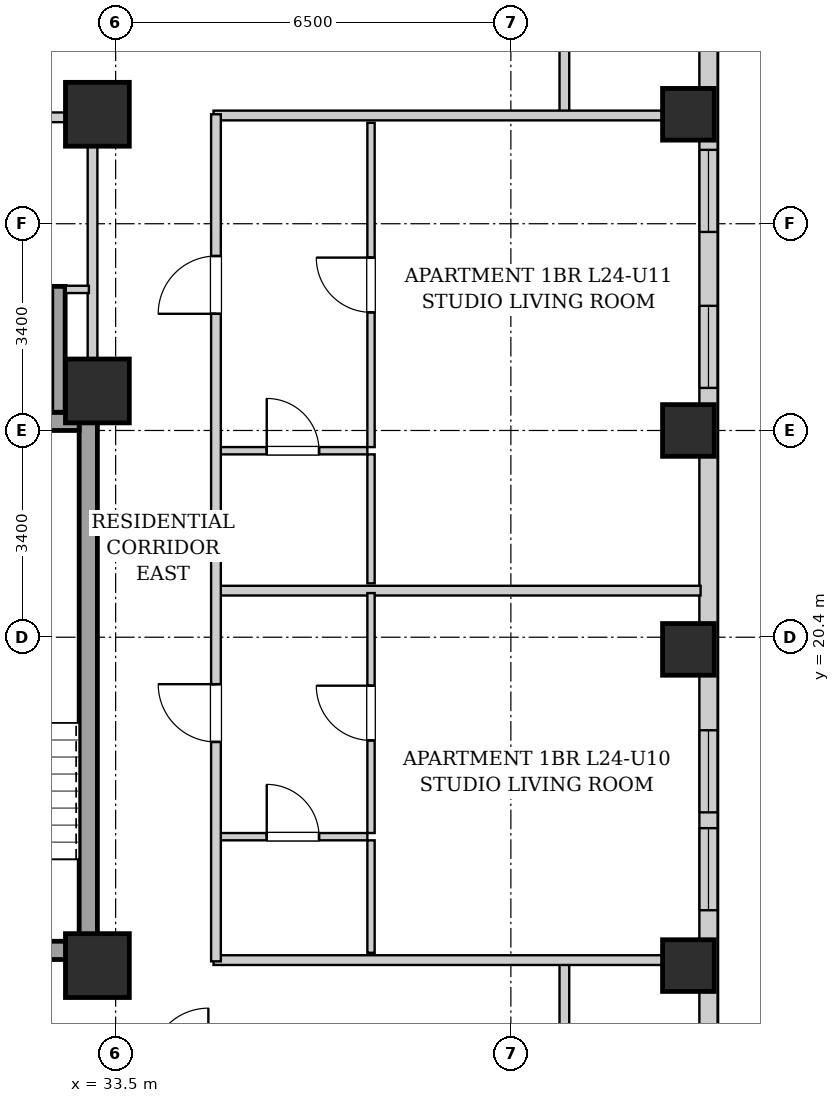
"""IFC4 building model, lengths in metres.
Left out: names, types, materials, properties, quantities, classifications, styles, units other than length and angle.
Written with IfcOpenShell. Run it as: python <this file> out.ifc"""

import sys

from ifc_helpers import new_model, si_unit, direction, frame, frame_2d, origin, origin_2d, place, context, subcontext, project, spatial, rectangle, extrude, element, fill, save


model = new_model("IFC4")
c1 = context("Model", 3, precision=1e-05, world=origin(), true_north=direction((0.0, 1.0)))
c2 = subcontext(c1, "Body", "Model", "MODEL_VIEW")
j1 = project(units=[si_unit("LENGTHUNIT", "METRE"), si_unit("PLANEANGLEUNIT", "RADIAN")], contexts=[c1])
p1 = place(None, origin())
s1 = spatial("IfcSite", under=j1, at=p1, CompositionType="ELEMENT")
p2 = place(p1, origin())
s2 = spatial("IfcBuilding", under=s1, at=p2, CompositionType="ELEMENT")
p3 = place(p2, frame((0.0, 0.0, 87.9)))
s3 = spatial("IfcBuildingStorey", under=s2, at=p3, CompositionType="ELEMENT", Elevation=87.9)
for number, where, z_axis, x_axis in (
    (1, (42.92, 15.0, 0.0), (0.0, 0.0, 1.0), (1.0, 0.0, 0.0)),
    (2, (42.92, 20.2, 0.0), (0.0, 0.0, 1.0), (1.0, 0.0, 0.0)),
    (3, (42.92, 23.8, 0.0), (0.0, 0.0, 1.0), (1.0, 0.0, 0.0)),
    (4, (42.92, 29.0, 0.0), (0.0, 0.0, 1.0), (1.0, 0.0, 0.0)),
):
    element("IfcColumn", number, at=place(p3, frame(where, z_axis=z_axis, x_axis=x_axis)), inside=s3, PredefinedType="COLUMN", context=c2, shape_type="SweptSolid", body=[
        extrude(rectangle(XDim=0.85, YDim=0.85, at=origin_2d()), origin(), (0.0, 0.0, 1.0), 3.2),
    ])
for number, where, z_axis, x_axis in (
    (5, (33.2, 15.0, 0.0), (0.0, 0.0, 1.0), (1.0, 0.0, 0.0)),
    (6, (33.2, 29.0, 0.0), (0.0, 0.0, 1.0), (1.0, 0.0, 0.0)),
    (7, (33.2, 24.45, 0.0), (0.0, 0.0, 1.0), (1.0, 0.0, 0.0)),
):
    element("IfcColumn", number, at=place(p3, frame(where, z_axis=z_axis, x_axis=x_axis)), inside=s3, PredefinedType="COLUMN", context=c2, shape_type="SweptSolid", body=[
        extrude(rectangle(XDim=1.05, YDim=1.05, at=origin_2d()), origin(), (0.0, 0.0, 1.0), 3.2),
    ])
p4 = place(p3, frame((43.25, 40.8, 0.0), z_axis=(0.0, 0.0, 1.0), x_axis=(0.0, -1.0, 0.0)))
e8 = element("IfcWall", 8, at=p4, inside=s3, PredefinedType="SOLIDWALL", context=c2, shape_type="SweptSolid", body=[
    extrude(rectangle(XDim=38.3, YDim=0.3, at=frame_2d((19.15, 0.0))), origin(), (0.0, 0.0, 1.0), 2.94),
])
p5 = place(p4, frame((33.495, 0.0, 0.55)))
e9 = element("IfcOpeningElement", 9, at=p5, cuts=e8, PredefinedType="OPENING", context=c2, shape_type="SweptSolid", body=[
    extrude(rectangle(XDim=1.35, YDim=1.2, at=frame_2d((0.675, 0.6))), frame((0.0, 0.16, 0.0), z_axis=(0.0, -1.0, 0.0), x_axis=(1.0, 0.0, 0.0)), (0.0, 0.0, 1.0), 0.32),
])
p6 = place(p4, frame((31.785, 0.0, 0.55)))
e10 = element("IfcOpeningElement", 10, at=p6, cuts=e8, PredefinedType="OPENING", context=c2, shape_type="SweptSolid", body=[
    extrude(rectangle(XDim=1.35, YDim=1.2, at=frame_2d((0.675, 0.6))), frame((0.0, 0.16, 0.0), z_axis=(0.0, -1.0, 0.0), x_axis=(1.0, 0.0, 0.0)), (0.0, 0.0, 1.0), 0.32),
])
p7 = place(p4, frame((3.08, 0.0, 0.55)))
e11 = element("IfcOpeningElement", 11, at=p7, cuts=e8, PredefinedType="OPENING", context=c2, shape_type="SweptSolid", body=[
    extrude(rectangle(XDim=1.35, YDim=1.2, at=frame_2d((0.675, 0.6))), frame((0.0, 0.16, 0.0), z_axis=(0.0, -1.0, 0.0), x_axis=(1.0, 0.0, 0.0)), (0.0, 0.0, 1.0), 0.32),
])
p8 = place(p4, frame((1.135, 0.0, 0.55)))
e12 = element("IfcOpeningElement", 12, at=p8, cuts=e8, PredefinedType="OPENING", context=c2, shape_type="SweptSolid", body=[
    extrude(rectangle(XDim=1.35, YDim=1.2, at=frame_2d((0.675, 0.6))), frame((0.0, 0.16, 0.0), z_axis=(0.0, -1.0, 0.0), x_axis=(1.0, 0.0, 0.0)), (0.0, 0.0, 1.0), 0.32),
])
p9 = place(p4, frame((21.93, 0.0, 0.55)))
e13 = element("IfcOpeningElement", 13, at=p9, cuts=e8, PredefinedType="OPENING", context=c2, shape_type="SweptSolid", body=[
    extrude(rectangle(XDim=1.35, YDim=1.2, at=frame_2d((0.675, 0.6))), frame((0.0, 0.16, 0.0), z_axis=(0.0, -1.0, 0.0), x_axis=(1.0, 0.0, 0.0)), (0.0, 0.0, 1.0), 0.32),
])
p10 = place(p4, frame((23.54, 0.0, 0.55)))
e14 = element("IfcOpeningElement", 14, at=p10, cuts=e8, PredefinedType="OPENING", context=c2, shape_type="SweptSolid", body=[
    extrude(rectangle(XDim=1.35, YDim=1.2, at=frame_2d((0.675, 0.6))), frame((0.0, 0.16, 0.0), z_axis=(0.0, -1.0, 0.0), x_axis=(1.0, 0.0, 0.0)), (0.0, 0.0, 1.0), 0.32),
])
p11 = place(p4, frame((14.95, 0.0, 0.55)))
e15 = element("IfcOpeningElement", 15, at=p11, cuts=e8, PredefinedType="OPENING", context=c2, shape_type="SweptSolid", body=[
    extrude(rectangle(XDim=1.35, YDim=1.2, at=frame_2d((0.675, 0.6))), frame((0.0, 0.16, 0.0), z_axis=(0.0, -1.0, 0.0), x_axis=(1.0, 0.0, 0.0)), (0.0, 0.0, 1.0), 0.32),
])
p12 = place(p4, frame((12.385, 0.0, 0.55)))
e16 = element("IfcOpeningElement", 16, at=p12, cuts=e8, PredefinedType="OPENING", context=c2, shape_type="SweptSolid", body=[
    extrude(rectangle(XDim=1.35, YDim=1.2, at=frame_2d((0.675, 0.6))), frame((0.0, 0.16, 0.0), z_axis=(0.0, -1.0, 0.0), x_axis=(1.0, 0.0, 0.0)), (0.0, 0.0, 1.0), 0.32),
])
p13 = place(p3, frame((33.05, 15.1, 0.0), z_axis=(0.0, 0.0, 1.0), x_axis=(0.0, 1.0, 0.0)))
e17 = element("IfcWall", 17, at=p13, inside=s3, PredefinedType="SHEAR", context=c2, shape_type="SweptSolid", body=[
    extrude(rectangle(XDim=9.0, YDim=0.3, at=frame_2d((4.5, 0.0))), origin(), (0.0, 0.0, 1.0), 2.94),
])
p14 = place(p3, frame((30.05, 23.95, 0.0), z_axis=(0.0, 0.0, 1.0), x_axis=(1.0, 0.0, 0.0)))
e18 = element("IfcWall", 18, at=p14, inside=s3, PredefinedType="SHEAR", context=c2, shape_type="SweptSolid", body=[
    extrude(rectangle(XDim=2.85, YDim=0.3, at=frame_2d((1.425, 0.0))), origin(), (0.0, 0.0, 1.0), 2.94),
])
p15 = place(p3, frame((30.05, 15.25, 0.0), z_axis=(0.0, 0.0, 1.0), x_axis=(1.0, 0.0, 0.0)))
e19 = element("IfcWall", 19, at=p15, inside=s3, PredefinedType="SHEAR", context=c2, shape_type="SweptSolid", body=[
    extrude(rectangle(XDim=2.85, YDim=0.3, at=frame_2d((1.425, 0.0))), origin(), (0.0, 0.0, 1.0), 2.94),
])
p16 = place(p15, frame((0.86, 0.0, 0.0)))
e20 = element("IfcOpeningElement", 20, at=p16, cuts=e19, PredefinedType="OPENING", context=c2, shape_type="SweptSolid", body=[
    extrude(rectangle(XDim=1.1, YDim=2.05, at=frame_2d((0.55, 1.025))), frame((0.0, 0.16, 0.0), z_axis=(0.0, -1.0, 0.0), x_axis=(1.0, 0.0, 0.0)), (0.0, 0.0, 1.0), 0.32),
])
p17 = place(p3, frame((32.56, 24.1, 0.0), z_axis=(0.0, 0.0, 1.0), x_axis=(0.0, 1.0, 0.0)))
e21 = element("IfcWall", 21, at=p17, inside=s3, PredefinedType="SHEAR", context=c2, shape_type="SweptSolid", body=[
    extrude(rectangle(XDim=2.07, YDim=0.22, at=frame_2d((1.035, 0.0))), origin(), (0.0, 0.0, 1.0), 2.94),
])
p18 = place(p3, frame((33.12, 24.12, 0.0), z_axis=(0.0, 0.0, 1.0), x_axis=(0.0, 1.0, 0.0)))
e22 = element("IfcWall", 22, at=p18, inside=s3, PredefinedType="PARTITIONING", context=c2, shape_type="SweptSolid", body=[
    extrude(rectangle(XDim=4.76, YDim=0.16, at=frame_2d((2.38, 0.0))), origin(), (0.0, 0.0, 1.0), 2.275),
])
p19 = place(p3, frame((32.68, 26.12, 0.0), z_axis=(0.0, 0.0, 1.0), x_axis=(1.0, 0.0, 0.0)))
e23 = element("IfcWall", 23, at=p19, inside=s3, PredefinedType="PARTITIONING", context=c2, shape_type="SweptSolid", body=[
    extrude(rectangle(XDim=0.38, YDim=0.12, at=frame_2d((0.19, 0.0))), origin(), (0.0, 0.0, 1.0), 2.94),
])
p20 = place(p3, frame((30.08, 28.95, 0.0), z_axis=(0.0, 0.0, 1.0), x_axis=(1.0, 0.0, 0.0)))
e24 = element("IfcWall", 24, at=p20, inside=s3, PredefinedType="PARTITIONING", context=c2, shape_type="SweptSolid", body=[
    extrude(rectangle(XDim=2.96, YDim=0.16, at=frame_2d((1.48, 0.0))), origin(), (0.0, 0.0, 1.0), 2.94),
])
p21 = place(p20, frame((1.045, 0.0, 0.0)))
e25 = element("IfcOpeningElement", 25, at=p21, cuts=e24, PredefinedType="OPENING", context=c2, shape_type="SweptSolid", body=[
    extrude(rectangle(XDim=0.86, YDim=2.05, at=frame_2d((0.43, 1.025))), frame((0.0, 0.09, 0.0), z_axis=(0.0, -1.0, 0.0), x_axis=(1.0, 0.0, 0.0)), (0.0, 0.0, 1.0), 0.18),
])
for number, where, z_axis, x_axis in (
    (26, (40.88, 13.35, 0.0), (0.0, 0.0, 1.0), (0.0, 1.0, 0.0)),
    (27, (40.88, 28.98, 0.0), (0.0, 0.0, 1.0), (0.0, 1.0, 0.0)),
):
    element("IfcWall", number, at=place(p3, frame(where, z_axis=z_axis, x_axis=x_axis)), inside=s3, PredefinedType="PARTITIONING", context=c2, shape_type="SweptSolid", body=[
        extrude(rectangle(XDim=1.74, YDim=0.16, at=frame_2d((0.87, 0.0))), origin(), (0.0, 0.0, 1.0), 2.94),
    ])
for number, where, z_axis, x_axis in (
    (28, (35.11, 15.09, 0.0), (0.0, 0.0, 1.0), (1.0, 0.0, 0.0)),
    (29, (35.11, 28.98, 0.0), (0.0, 0.0, 1.0), (1.0, 0.0, 0.0)),
):
    element("IfcWall", number, at=place(p3, frame(where, z_axis=z_axis, x_axis=x_axis)), inside=s3, PredefinedType="PARTITIONING", context=c2, shape_type="SweptSolid", body=[
        extrude(rectangle(XDim=8.01, YDim=0.16, at=frame_2d((4.005, 0.0))), origin(), (0.0, 0.0, 1.0), 2.309),
    ])
p22 = place(p3, frame((35.19, 21.166, 0.0), z_axis=(0.0, 0.0, 1.0), x_axis=(1.0, 0.0, 0.0)))
e30 = element("IfcWall", 30, at=p22, inside=s3, PredefinedType="PARTITIONING", context=c2, shape_type="SweptSolid", body=[
    extrude(rectangle(XDim=7.93, YDim=0.16, at=frame_2d((3.965, 0.0))), origin(), (0.0, 0.0, 1.0), 2.94),
])
p23 = place(p3, frame((35.19, 17.12, 0.0), z_axis=(0.0, 0.0, 1.0), x_axis=(1.0, 0.0, 0.0)))
e31 = element("IfcWall", 31, at=p23, inside=s3, PredefinedType="PARTITIONING", context=c2, shape_type="SweptSolid", body=[
    extrude(rectangle(XDim=2.45, YDim=0.12, at=frame_2d((1.225, 0.0))), origin(), (0.0, 0.0, 1.0), 2.94),
])
p24 = place(p23, frame((0.795, 0.0, 0.0)))
e32 = element("IfcOpeningElement", 32, at=p24, cuts=e31, PredefinedType="OPENING", context=c2, shape_type="SweptSolid", body=[
    extrude(rectangle(XDim=0.86, YDim=2.05, at=frame_2d((0.43, 1.025))), frame((0.0, 0.07, 0.0), z_axis=(0.0, -1.0, 0.0), x_axis=(1.0, 0.0, 0.0)), (0.0, 0.0, 1.0), 0.14),
])
p25 = place(p3, frame((37.7, 15.21, 0.0), z_axis=(0.0, 0.0, 1.0), x_axis=(0.0, 1.0, 0.0)))
e33 = element("IfcWall", 33, at=p25, inside=s3, PredefinedType="PARTITIONING", context=c2, shape_type="SweptSolid", body=[
    extrude(rectangle(XDim=1.85, YDim=0.12, at=frame_2d((0.925, 0.0))), origin(), (0.0, 0.0, 1.0), 2.94),
])
p26 = place(p3, frame((37.7, 17.18, 0.0), z_axis=(0.0, 0.0, 1.0), x_axis=(0.0, 1.0, 0.0)))
e34 = element("IfcWall", 34, at=p26, inside=s3, PredefinedType="PARTITIONING", context=c2, shape_type="SweptSolid", body=[
    extrude(rectangle(XDim=3.946, YDim=0.12, at=frame_2d((1.973, 0.0))), origin(), (0.0, 0.0, 1.0), 2.94),
])
p27 = place(p26, frame((1.523, 0.0, 0.0)))
e35 = element("IfcOpeningElement", 35, at=p27, cuts=e34, PredefinedType="OPENING", context=c2, shape_type="SweptSolid", body=[
    extrude(rectangle(XDim=0.9, YDim=2.05, at=frame_2d((0.45, 1.025))), frame((0.0, 0.07, 0.0), z_axis=(0.0, -1.0, 0.0), x_axis=(1.0, 0.0, 0.0)), (0.0, 0.0, 1.0), 0.14),
])
p28 = place(p3, frame((35.19, 23.467, 0.0), z_axis=(0.0, 0.0, 1.0), x_axis=(1.0, 0.0, 0.0)))
e36 = element("IfcWall", 36, at=p28, inside=s3, PredefinedType="PARTITIONING", context=c2, shape_type="SweptSolid", body=[
    extrude(rectangle(XDim=2.45, YDim=0.12, at=frame_2d((1.225, 0.0))), origin(), (0.0, 0.0, 1.0), 2.94),
])
p29 = place(p28, frame((0.795, 0.0, 0.0)))
e37 = element("IfcOpeningElement", 37, at=p29, cuts=e36, PredefinedType="OPENING", context=c2, shape_type="SweptSolid", body=[
    extrude(rectangle(XDim=0.86, YDim=2.05, at=frame_2d((0.43, 1.025))), frame((0.0, 0.07, 0.0), z_axis=(0.0, -1.0, 0.0), x_axis=(1.0, 0.0, 0.0)), (0.0, 0.0, 1.0), 0.14),
])
p30 = place(p3, frame((37.7, 21.286, 0.0), z_axis=(0.0, 0.0, 1.0), x_axis=(0.0, 1.0, 0.0)))
e38 = element("IfcWall", 38, at=p30, inside=s3, PredefinedType="PARTITIONING", context=c2, shape_type="SweptSolid", body=[
    extrude(rectangle(XDim=2.121, YDim=0.12, at=frame_2d((1.061, 0.0))), origin(), (0.0, 0.0, 1.0), 2.94),
])
p31 = place(p3, frame((37.7, 23.527, 0.0), z_axis=(0.0, 0.0, 1.0), x_axis=(0.0, 1.0, 0.0)))
e39 = element("IfcWall", 39, at=p31, inside=s3, PredefinedType="PARTITIONING", context=c2, shape_type="SweptSolid", body=[
    extrude(rectangle(XDim=5.333, YDim=0.12, at=frame_2d((2.667, 0.0))), origin(), (0.0, 0.0, 1.0), 2.94),
])
p32 = place(p31, frame((2.216, 0.0, 0.0)))
e40 = element("IfcOpeningElement", 40, at=p32, cuts=e39, PredefinedType="OPENING", context=c2, shape_type="SweptSolid", body=[
    extrude(rectangle(XDim=0.9, YDim=2.05, at=frame_2d((0.45, 1.025))), frame((0.0, 0.07, 0.0), z_axis=(0.0, -1.0, 0.0), x_axis=(1.0, 0.0, 0.0)), (0.0, 0.0, 1.0), 0.14),
])
p33 = place(p3, frame((35.15, 15.07, 0.0), z_axis=(0.0, 0.0, 1.0), x_axis=(0.0, 1.0, 0.0)))
e41 = element("IfcWall", 41, at=p33, inside=s3, PredefinedType="PARTITIONING", context=c2, shape_type="SweptSolid", body=[
    extrude(rectangle(XDim=13.93, YDim=0.16, at=frame_2d((6.965, 0.0))), origin(), (0.0, 0.0, 1.0), 2.94),
])
p34 = place(p33, frame((3.608, 0.0, 0.0)))
e42 = element("IfcOpeningElement", 42, at=p34, cuts=e41, PredefinedType="OPENING", context=c2, shape_type="SweptSolid", body=[
    extrude(rectangle(XDim=0.95, YDim=2.1, at=frame_2d((0.475, 1.05))), frame((0.0, 0.09, 0.0), z_axis=(0.0, -1.0, 0.0), x_axis=(1.0, 0.0, 0.0)), (0.0, 0.0, 1.0), 0.18),
])
p35 = place(p33, frame((10.649, 0.0, 0.0)))
e43 = element("IfcOpeningElement", 43, at=p35, cuts=e41, PredefinedType="OPENING", context=c2, shape_type="SweptSolid", body=[
    extrude(rectangle(XDim=0.95, YDim=2.1, at=frame_2d((0.475, 1.05))), frame((0.0, 0.09, 0.0), z_axis=(0.0, -1.0, 0.0), x_axis=(1.0, 0.0, 0.0)), (0.0, 0.0, 1.0), 0.18),
])
p36 = place(p24, origin())
e44 = element("IfcDoor", 44, at=p36, inside=s3, OperationType="SINGLE_SWING_LEFT", PredefinedType="DOOR", context=c2, shape_type="SweptSolid", body=[
    extrude(rectangle(XDim=0.86, YDim=2.05, at=frame_2d((0.43, 1.025))), frame((0.0, 0.025, 0.0), z_axis=(0.0, -1.0, 0.0), x_axis=(1.0, 0.0, 0.0)), (0.0, 0.0, 1.0), 0.05),
])
fill(e32, e44)
p37 = place(p27, origin())
e45 = element("IfcDoor", 45, at=p37, inside=s3, OperationType="SINGLE_SWING_RIGHT", PredefinedType="DOOR", context=c2, shape_type="SweptSolid", body=[
    extrude(rectangle(XDim=0.9, YDim=2.05, at=frame_2d((0.45, 1.025))), frame((0.0, 0.025, 0.0), z_axis=(0.0, -1.0, 0.0), x_axis=(1.0, 0.0, 0.0)), (0.0, 0.0, 1.0), 0.05),
])
fill(e35, e45)
p38 = place(p29, origin())
e46 = element("IfcDoor", 46, at=p38, inside=s3, OperationType="SINGLE_SWING_LEFT", PredefinedType="DOOR", context=c2, shape_type="SweptSolid", body=[
    extrude(rectangle(XDim=0.86, YDim=2.05, at=frame_2d((0.43, 1.025))), frame((0.0, 0.025, 0.0), z_axis=(0.0, -1.0, 0.0), x_axis=(1.0, 0.0, 0.0)), (0.0, 0.0, 1.0), 0.05),
])
fill(e37, e46)
p39 = place(p32, origin())
e47 = element("IfcDoor", 47, at=p39, inside=s3, OperationType="SINGLE_SWING_RIGHT", PredefinedType="DOOR", context=c2, shape_type="SweptSolid", body=[
    extrude(rectangle(XDim=0.9, YDim=2.05, at=frame_2d((0.45, 1.025))), frame((0.0, 0.025, 0.0), z_axis=(0.0, -1.0, 0.0), x_axis=(1.0, 0.0, 0.0)), (0.0, 0.0, 1.0), 0.05),
])
fill(e40, e47)
p40 = place(p34, origin())
e48 = element("IfcDoor", 48, at=p40, inside=s3, OperationType="SINGLE_SWING_RIGHT", PredefinedType="DOOR", context=c2, shape_type="SweptSolid", body=[
    extrude(rectangle(XDim=0.95, YDim=2.1, at=frame_2d((0.475, 1.05))), frame((0.0, 0.025, 0.0), z_axis=(0.0, -1.0, 0.0), x_axis=(1.0, 0.0, 0.0)), (0.0, 0.0, 1.0), 0.05),
])
fill(e42, e48)
p41 = place(p35, origin())
e49 = element("IfcDoor", 49, at=p41, inside=s3, OperationType="SINGLE_SWING_LEFT", PredefinedType="DOOR", context=c2, shape_type="SweptSolid", body=[
    extrude(rectangle(XDim=0.95, YDim=2.1, at=frame_2d((0.475, 1.05))), frame((0.0, 0.025, 0.0), z_axis=(0.0, -1.0, 0.0), x_axis=(1.0, 0.0, 0.0)), (0.0, 0.0, 1.0), 0.05),
])
fill(e43, e49)
p42 = place(p9, origin())
e50 = element("IfcWindow", 50, at=p42, inside=s3, PartitioningType="SINGLE_PANEL", PredefinedType="WINDOW", context=c2, shape_type="SweptSolid", body=[
    extrude(rectangle(XDim=1.35, YDim=1.2, at=frame_2d((0.675, 0.6))), frame((0.0, 0.03, 0.0), z_axis=(0.0, -1.0, 0.0), x_axis=(1.0, 0.0, 0.0)), (0.0, 0.0, 1.0), 0.06),
])
fill(e13, e50)
p43 = place(p10, origin())
e51 = element("IfcWindow", 51, at=p43, inside=s3, PartitioningType="SINGLE_PANEL", PredefinedType="WINDOW", context=c2, shape_type="SweptSolid", body=[
    extrude(rectangle(XDim=1.35, YDim=1.2, at=frame_2d((0.675, 0.6))), frame((0.0, 0.03, 0.0), z_axis=(0.0, -1.0, 0.0), x_axis=(1.0, 0.0, 0.0)), (0.0, 0.0, 1.0), 0.06),
])
fill(e14, e51)
p44 = place(p11, origin())
e52 = element("IfcWindow", 52, at=p44, inside=s3, PartitioningType="SINGLE_PANEL", PredefinedType="WINDOW", context=c2, shape_type="SweptSolid", body=[
    extrude(rectangle(XDim=1.35, YDim=1.2, at=frame_2d((0.675, 0.6))), frame((0.0, 0.03, 0.0), z_axis=(0.0, -1.0, 0.0), x_axis=(1.0, 0.0, 0.0)), (0.0, 0.0, 1.0), 0.06),
])
fill(e15, e52)
p45 = place(p12, origin())
e53 = element("IfcWindow", 53, at=p45, inside=s3, PartitioningType="SINGLE_PANEL", PredefinedType="WINDOW", context=c2, shape_type="SweptSolid", body=[
    extrude(rectangle(XDim=1.35, YDim=1.2, at=frame_2d((0.675, 0.6))), frame((0.0, 0.03, 0.0), z_axis=(0.0, -1.0, 0.0), x_axis=(1.0, 0.0, 0.0)), (0.0, 0.0, 1.0), 0.06),
])
fill(e16, e53)
save(model, sys.argv[1])
